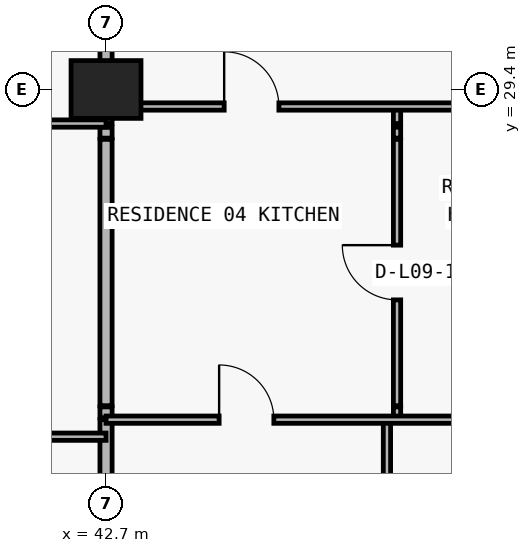
"""IFC4 building model, lengths in metres.
Left out: names, types, materials, properties, quantities, classifications, styles, units other than length and angle.
Written with IfcOpenShell. Run it as: python <this file> out.ifc"""

import sys

from ifc_helpers import new_model, si_unit, direction, frame, frame_2d, origin, origin_2d, place, context, subcontext, project, spatial, rectangle, extrude, element, fill, save


model = new_model("IFC4")
c1 = context("Model", 3, precision=1e-05, world=origin(), true_north=direction((0.0, 1.0)))
c2 = subcontext(c1, "Body", "Model", "MODEL_VIEW")
j1 = project(units=[si_unit("LENGTHUNIT", "METRE"), si_unit("PLANEANGLEUNIT", "RADIAN")], contexts=[c1])
p1 = place(None, origin())
s1 = spatial("IfcSite", under=j1, at=p1, CompositionType="ELEMENT")
p2 = place(p1, origin())
s2 = spatial("IfcBuilding", under=s1, at=p2, CompositionType="ELEMENT")
p3 = place(p2, frame((0.0, 0.0, 39.9)))
s3 = spatial("IfcBuildingStorey", under=s2, at=p3, CompositionType="ELEMENT", Elevation=39.9)
p4 = place(p3, frame((42.7, 29.4, 0.0), z_axis=(0.0, 0.0, 1.0), x_axis=(1.0, 0.0, 0.0)))
e1 = element("IfcColumn", 1, at=p4, inside=s3, PredefinedType="COLUMN", context=c2, shape_type="SweptSolid", body=[
    extrude(rectangle(XDim=1.15, YDim=0.95, at=origin_2d()), origin(), (0.0, 0.0, 1.0), 3.05),
])
p5 = place(p3, frame((42.7, 6.24, 0.0), z_axis=(0.0, 0.0, 1.0), x_axis=(0.0, 1.0, 0.0)))
e2 = element("IfcWall", 2, at=p5, inside=s3, PredefinedType="PARTITIONING", context=c2, shape_type="SweptSolid", body=[
    extrude(rectangle(XDim=17.73, YDim=0.2, at=frame_2d((8.865, 0.0))), origin(), (0.0, 0.0, 1.0), 2.11),
])
p6 = place(p3, frame((42.7, 24.0, 0.0), z_axis=(0.0, 0.0, 1.0), x_axis=(0.0, 1.0, 0.0)))
e3 = element("IfcWall", 3, at=p6, inside=s3, PredefinedType="PARTITIONING", context=c2, shape_type="SweptSolid", body=[
    extrude(rectangle(XDim=0.18, YDim=0.2, at=frame_2d((0.09, 0.0))), origin(), (0.0, 0.0, 1.0), 2.11),
])
p7 = place(p3, frame((42.7, 24.2, 0.0), z_axis=(0.0, 0.0, 1.0), x_axis=(0.0, 1.0, 0.0)))
e4 = element("IfcWall", 4, at=p7, inside=s3, PredefinedType="PARTITIONING", context=c2, shape_type="SweptSolid", body=[
    extrude(rectangle(XDim=4.38, YDim=0.2, at=frame_2d((2.19, 0.0))), origin(), (0.0, 0.0, 1.0), 2.11),
])
p8 = place(p3, frame((42.7, 28.6, 0.0), z_axis=(0.0, 0.0, 1.0), x_axis=(0.0, 1.0, 0.0)))
e5 = element("IfcWall", 5, at=p8, inside=s3, PredefinedType="PARTITIONING", context=c2, shape_type="SweptSolid", body=[
    extrude(rectangle(XDim=0.18, YDim=0.2, at=frame_2d((0.09, 0.0))), origin(), (0.0, 0.0, 1.0), 2.11),
])
p9 = place(p3, frame((42.7, 28.84, 0.0), z_axis=(0.0, 0.0, 1.0), x_axis=(0.0, 1.0, 0.0)))
e6 = element("IfcWall", 6, at=p9, inside=s3, PredefinedType="PARTITIONING", context=c2, shape_type="SweptSolid", body=[
    extrude(rectangle(XDim=5.16, YDim=0.2, at=frame_2d((2.58, 0.0))), origin(), (0.0, 0.0, 1.0), 2.11),
])
p10 = place(p3, frame((47.32, 6.24, 0.0), z_axis=(0.0, 0.0, 1.0), x_axis=(0.0, 1.0, 0.0)))
e7 = element("IfcWall", 7, at=p10, inside=s3, PredefinedType="PARTITIONING", context=c2, shape_type="SweptSolid", body=[
    extrude(rectangle(XDim=17.73, YDim=0.12, at=frame_2d((8.865, 0.0))), origin(), (0.0, 0.0, 1.0), 3.05),
])
p11 = place(p3, frame((47.486, 24.0, 0.0), z_axis=(0.0, 0.0, 1.0), x_axis=(0.0, 1.0, 0.0)))
e8 = element("IfcWall", 8, at=p11, inside=s3, PredefinedType="PARTITIONING", context=c2, shape_type="SweptSolid", body=[
    extrude(rectangle(XDim=0.18, YDim=0.12, at=frame_2d((0.09, 0.0))), origin(), (0.0, 0.0, 1.0), 3.05),
])
p12 = place(p3, frame((47.486, 24.2, 0.0), z_axis=(0.0, 0.0, 1.0), x_axis=(0.0, 1.0, 0.0)))
e9 = element("IfcWall", 9, at=p12, inside=s3, PredefinedType="PARTITIONING", context=c2, shape_type="SweptSolid", body=[
    extrude(rectangle(XDim=4.38, YDim=0.12, at=frame_2d((2.19, 0.0))), origin(), (0.0, 0.0, 1.0), 3.05),
])
p13 = place(p12, frame((1.74, 0.0, 0.0)))
e10 = element("IfcOpeningElement", 10, at=p13, cuts=e9, PredefinedType="OPENING", context=c2, shape_type="SweptSolid", body=[
    extrude(rectangle(XDim=0.9, YDim=2.15, at=frame_2d((0.45, 1.075))), frame((0.0, 0.07, 0.0), z_axis=(0.0, -1.0, 0.0), x_axis=(1.0, 0.0, 0.0)), (0.0, 0.0, 1.0), 0.14),
])
p14 = place(p3, frame((47.486, 28.6, 0.0), z_axis=(0.0, 0.0, 1.0), x_axis=(0.0, 1.0, 0.0)))
e11 = element("IfcWall", 11, at=p14, inside=s3, PredefinedType="PARTITIONING", context=c2, shape_type="SweptSolid", body=[
    extrude(rectangle(XDim=0.18, YDim=0.12, at=frame_2d((0.09, 0.0))), origin(), (0.0, 0.0, 1.0), 3.05),
])
p15 = place(p3, frame((47.486, 28.84, 0.0), z_axis=(0.0, 0.0, 1.0), x_axis=(0.0, 1.0, 0.0)))
e12 = element("IfcWall", 12, at=p15, inside=s3, PredefinedType="PARTITIONING", context=c2, shape_type="SweptSolid", body=[
    extrude(rectangle(XDim=0.28, YDim=0.12, at=frame_2d((0.14, 0.0))), origin(), (0.0, 0.0, 1.0), 3.05),
])
p16 = place(p3, frame((35.1, 23.69, 0.0), z_axis=(0.0, 0.0, 1.0), x_axis=(1.0, 0.0, 0.0)))
e13 = element("IfcWall", 13, at=p16, inside=s3, PredefinedType="PARTITIONING", context=c2, shape_type="SweptSolid", body=[
    extrude(rectangle(XDim=7.6, YDim=0.12, at=frame_2d((3.8, 0.0))), origin(), (0.0, 0.0, 1.0), 3.05),
])
p17 = place(p16, frame((1.336, 0.0, 0.0)))
e14 = element("IfcOpeningElement", 14, at=p17, cuts=e13, PredefinedType="OPENING", context=c2, shape_type="SweptSolid", body=[
    extrude(rectangle(XDim=0.9, YDim=2.15, at=frame_2d((0.45, 1.075))), frame((0.0, 0.07, 0.0), z_axis=(0.0, -1.0, 0.0), x_axis=(1.0, 0.0, 0.0)), (0.0, 0.0, 1.0), 0.14),
])
p18 = place(p16, frame((5.402, 0.0, 0.0)))
e15 = element("IfcOpeningElement", 15, at=p18, cuts=e13, PredefinedType="OPENING", context=c2, shape_type="SweptSolid", body=[
    extrude(rectangle(XDim=0.9, YDim=2.15, at=frame_2d((0.45, 1.075))), frame((0.0, 0.07, 0.0), z_axis=(0.0, -1.0, 0.0), x_axis=(1.0, 0.0, 0.0)), (0.0, 0.0, 1.0), 0.14),
])
p19 = place(p3, frame((42.7, 23.97, 0.0), z_axis=(0.0, 0.0, 1.0), x_axis=(1.0, 0.0, 0.0)))
e16 = element("IfcWall", 16, at=p19, inside=s3, PredefinedType="PARTITIONING", context=c2, shape_type="SweptSolid", body=[
    extrude(rectangle(XDim=8.13, YDim=0.12, at=frame_2d((4.065, 0.0))), origin(), (0.0, 0.0, 1.0), 3.05),
])
p20 = place(p19, frame((1.86, 0.0, 0.0)))
e17 = element("IfcOpeningElement", 17, at=p20, cuts=e16, PredefinedType="OPENING", context=c2, shape_type="SweptSolid", body=[
    extrude(rectangle(XDim=0.9, YDim=2.15, at=frame_2d((0.45, 1.075))), frame((0.0, 0.07, 0.0), z_axis=(0.0, -1.0, 0.0), x_axis=(1.0, 0.0, 0.0)), (0.0, 0.0, 1.0), 0.14),
])
p21 = place(p19, frame((6.008, 0.0, 0.0)))
e18 = element("IfcOpeningElement", 18, at=p21, cuts=e16, PredefinedType="OPENING", context=c2, shape_type="SweptSolid", body=[
    extrude(rectangle(XDim=0.9, YDim=2.15, at=frame_2d((0.45, 1.075))), frame((0.0, 0.07, 0.0), z_axis=(0.0, -1.0, 0.0), x_axis=(1.0, 0.0, 0.0)), (0.0, 0.0, 1.0), 0.14),
])
p22 = place(p3, frame((35.1, 28.84, 0.0), z_axis=(0.0, 0.0, 1.0), x_axis=(1.0, 0.0, 0.0)))
e19 = element("IfcWall", 19, at=p22, inside=s3, PredefinedType="PARTITIONING", context=c2, shape_type="SweptSolid", body=[
    extrude(rectangle(XDim=7.6, YDim=0.12, at=frame_2d((3.8, 0.0))), origin(), (0.0, 0.0, 1.0), 3.05),
])
p23 = place(p22, frame((1.602, 0.0, 0.0)))
e20 = element("IfcOpeningElement", 20, at=p23, cuts=e19, PredefinedType="OPENING", context=c2, shape_type="SweptSolid", body=[
    extrude(rectangle(XDim=0.9, YDim=2.15, at=frame_2d((0.45, 1.075))), frame((0.0, 0.07, 0.0), z_axis=(0.0, -1.0, 0.0), x_axis=(1.0, 0.0, 0.0)), (0.0, 0.0, 1.0), 0.14),
])
p24 = place(p3, frame((42.7, 29.12, 0.0), z_axis=(0.0, 0.0, 1.0), x_axis=(1.0, 0.0, 0.0)))
e21 = element("IfcWall", 21, at=p24, inside=s3, PredefinedType="PARTITIONING", context=c2, shape_type="SweptSolid", body=[
    extrude(rectangle(XDim=8.13, YDim=0.12, at=frame_2d((4.065, 0.0))), origin(), (0.0, 0.0, 1.0), 2.11),
])
p25 = place(p24, frame((1.943, 0.0, 0.0)))
e22 = element("IfcOpeningElement", 22, at=p25, cuts=e21, PredefinedType="OPENING", context=c2, shape_type="SweptSolid", body=[
    extrude(rectangle(XDim=0.9, YDim=2.06, at=frame_2d((0.45, 1.03))), frame((0.0, 0.07, 0.0), z_axis=(0.0, -1.0, 0.0), x_axis=(1.0, 0.0, 0.0)), (0.0, 0.0, 1.0), 0.14),
])
p26 = place(p25, origin())
e23 = element("IfcDoor", 23, at=p26, inside=s3, OperationType="SINGLE_SWING_LEFT", PredefinedType="DOOR", context=c2, shape_type="SweptSolid", body=[
    extrude(rectangle(XDim=0.9, YDim=2.06, at=frame_2d((0.45, 1.03))), frame((0.0, 0.025, 0.0), z_axis=(0.0, -1.0, 0.0), x_axis=(1.0, 0.0, 0.0)), (0.0, 0.0, 1.0), 0.05),
])
fill(e22, e23)
p27 = place(p13, origin())
e24 = element("IfcDoor", 24, at=p27, inside=s3, OperationType="SINGLE_SWING_RIGHT", PredefinedType="DOOR", context=c2, shape_type="SweptSolid", body=[
    extrude(rectangle(XDim=0.9, YDim=2.15, at=frame_2d((0.45, 1.075))), frame((0.0, 0.025, 0.0), z_axis=(0.0, -1.0, 0.0), x_axis=(1.0, 0.0, 0.0)), (0.0, 0.0, 1.0), 0.05),
])
fill(e10, e24)
p28 = place(p20, origin())
e25 = element("IfcDoor", 25, at=p28, inside=s3, OperationType="SINGLE_SWING_LEFT", PredefinedType="DOOR", context=c2, shape_type="SweptSolid", body=[
    extrude(rectangle(XDim=0.9, YDim=2.15, at=frame_2d((0.45, 1.075))), frame((0.0, 0.025, 0.0), z_axis=(0.0, -1.0, 0.0), x_axis=(1.0, 0.0, 0.0)), (0.0, 0.0, 1.0), 0.05),
])
fill(e17, e25)
save(model, sys.argv[1])
